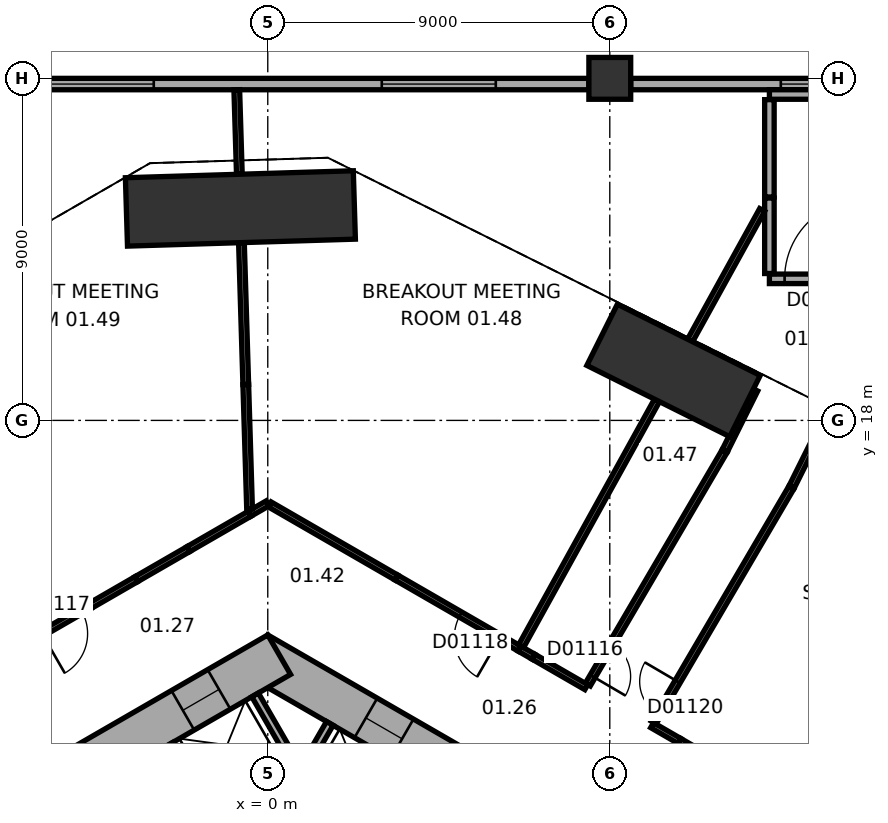
"""IFC4 building model, lengths in metres.
Left out: names, types, materials, properties, quantities, classifications, styles, units other than length and angle.
Written with IfcOpenShell. Run it as: python <this file> out.ifc"""

import sys

from ifc_helpers import new_model, si_unit, direction, frame, frame_2d, origin, origin_2d, place, context, subcontext, project, spatial, rectangle, extrude, element, fill, save


model = new_model("IFC4")
c1 = context("Model", 3, precision=1e-05, world=origin(), true_north=direction((0.0, 1.0)))
c2 = subcontext(c1, "Body", "Model", "MODEL_VIEW")
j1 = project(units=[si_unit("LENGTHUNIT", "METRE"), si_unit("PLANEANGLEUNIT", "RADIAN")], contexts=[c1])
p1 = place(None, origin())
s1 = spatial("IfcSite", under=j1, at=p1, CompositionType="ELEMENT")
p2 = place(p1, origin())
s2 = spatial("IfcBuilding", under=s1, at=p2, CompositionType="ELEMENT")
p3 = place(p2, frame((0.0, 0.0, 7.5)))
s3 = spatial("IfcBuildingStorey", under=s2, at=p3, CompositionType="ELEMENT", Elevation=7.5)
p4 = place(p3, frame((10.677, 19.315, 0.0), z_axis=(0.0, 0.0, 1.0), x_axis=(-0.894935140363, 0.446196251154, 0.0)))
e1 = element("IfcColumn", 1, at=p4, inside=s3, PredefinedType="COLUMN", context=c2, shape_type="SweptSolid", body=[
    extrude(rectangle(XDim=4.2, YDim=1.8, at=origin_2d()), origin(), (0.0, 0.0, 1.0), 5.5),
])
p5 = place(p3, frame((-0.72, 23.577, 0.0), z_axis=(0.0, 0.0, 1.0), x_axis=(-0.999533644135, -0.030536768695, 0.0)))
e2 = element("IfcColumn", 2, at=p5, inside=s3, PredefinedType="COLUMN", context=c2, shape_type="SweptSolid", body=[
    extrude(rectangle(XDim=6.0, YDim=1.8, at=origin_2d()), origin(), (0.0, 0.0, 1.0), 5.5),
])
p6 = place(p3, frame((9.0, 27.0, 0.0), z_axis=(0.0, 0.0, 1.0), x_axis=(1.0, 0.0, 0.0)))
e3 = element("IfcColumn", 3, at=p6, inside=s3, PredefinedType="COLUMN", context=c2, shape_type="SweptSolid", body=[
    extrude(rectangle(XDim=1.1, YDim=1.1, at=origin_2d()), origin(), (0.0, 0.0, 1.0), 5.5),
])
p7 = place(p3, frame((10.4, 5.658, 0.0), z_axis=(0.0, 0.0, 1.0), x_axis=(-0.866021384402, 0.500006961711, 0.0)))
e4 = element("IfcWall", 4, at=p7, inside=s3, PredefinedType="SHEAR", context=c2, shape_type="SweptSolid", body=[
    extrude(rectangle(XDim=12.355, YDim=1.2, at=frame_2d((6.178, 0.0))), origin(), (0.0, 0.0, 1.0), 5.5),
])
p8 = place(p7, frame((2.728, 0.0, 0.0)))
e5 = element("IfcOpeningElement", 5, at=p8, cuts=e4, PredefinedType="OPENING", context=c2, shape_type="SweptSolid", body=[
    extrude(rectangle(XDim=1.1, YDim=2.1, at=frame_2d((0.55, 1.05))), frame((0.0, 0.61, 0.0), z_axis=(0.0, -1.0, 0.0), x_axis=(1.0, 0.0, 0.0)), (0.0, 0.0, 1.0), 1.22),
])
p9 = place(p7, frame((5.328, 0.0, 0.0)))
e6 = element("IfcOpeningElement", 6, at=p9, cuts=e4, PredefinedType="OPENING", context=c2, shape_type="SweptSolid", body=[
    extrude(rectangle(XDim=1.1, YDim=2.1, at=frame_2d((0.55, 1.05))), frame((0.0, 0.61, 0.0), z_axis=(0.0, -1.0, 0.0), x_axis=(1.0, 0.0, 0.0)), (0.0, 0.0, 1.0), 1.22),
])
p10 = place(p7, frame((7.928, 0.0, 0.0)))
e7 = element("IfcOpeningElement", 7, at=p10, cuts=e4, PredefinedType="OPENING", context=c2, shape_type="SweptSolid", body=[
    extrude(rectangle(XDim=1.1, YDim=2.1, at=frame_2d((0.55, 1.05))), frame((0.0, 0.61, 0.0), z_axis=(0.0, -1.0, 0.0), x_axis=(1.0, 0.0, 0.0)), (0.0, 0.0, 1.0), 1.22),
])
p11 = place(p3, frame((0.3, 11.836, 0.0), z_axis=(0.0, 0.0, 1.0), x_axis=(-0.866021384402, -0.500006961711, 0.0)))
e8 = element("IfcWall", 8, at=p11, inside=s3, PredefinedType="SHEAR", context=c2, shape_type="SweptSolid", body=[
    extrude(rectangle(XDim=12.355, YDim=1.2, at=frame_2d((6.178, 0.0))), origin(), (0.0, 0.0, 1.0), 5.5),
])
p12 = place(p11, frame((6.378, 0.0, 0.0)))
e9 = element("IfcOpeningElement", 9, at=p12, cuts=e8, PredefinedType="OPENING", context=c2, shape_type="SweptSolid", body=[
    extrude(rectangle(XDim=1.5, YDim=2.1, at=frame_2d((0.75, 1.05))), frame((0.0, 0.61, 0.0), z_axis=(0.0, -1.0, 0.0), x_axis=(1.0, 0.0, 0.0)), (0.0, 0.0, 1.0), 1.22),
])
p13 = place(p11, frame((1.828, 0.0, 0.0)))
e10 = element("IfcOpeningElement", 10, at=p13, cuts=e8, PredefinedType="OPENING", context=c2, shape_type="SweptSolid", body=[
    extrude(rectangle(XDim=1.1, YDim=2.1, at=frame_2d((0.55, 1.05))), frame((0.0, 0.61, 0.0), z_axis=(0.0, -1.0, 0.0), x_axis=(1.0, 0.0, 0.0)), (0.0, 0.0, 1.0), 1.22),
])
p14 = place(p3, frame((26.45, 26.85, 0.0), z_axis=(0.0, 0.0, 1.0), x_axis=(-1.0, 0.0, 0.0)))
e11 = element("IfcWall", 11, at=p14, inside=s3, PredefinedType="STANDARD", context=c2, shape_type="SweptSolid", body=[
    extrude(rectangle(XDim=16.9, YDim=0.3, at=frame_2d((8.45, 0.0))), origin(), (0.0, 0.0, 1.0), 4.0),
])
p15 = place(p14, frame((2.95, 0.0, 1.0)))
e12 = element("IfcOpeningElement", 12, at=p15, cuts=e11, PredefinedType="OPENING", context=c2, shape_type="SweptSolid", body=[
    extrude(rectangle(XDim=3.0, YDim=2.6, at=frame_2d((1.5, 1.3))), frame((0.0, 0.16, 0.0), z_axis=(0.0, -1.0, 0.0), x_axis=(1.0, 0.0, 0.0)), (0.0, 0.0, 1.0), 0.32),
])
p16 = place(p14, frame((9.95, 0.0, 1.0)))
e13 = element("IfcOpeningElement", 13, at=p16, cuts=e11, PredefinedType="OPENING", context=c2, shape_type="SweptSolid", body=[
    extrude(rectangle(XDim=3.0, YDim=2.6, at=frame_2d((1.5, 1.3))), frame((0.0, 0.16, 0.0), z_axis=(0.0, -1.0, 0.0), x_axis=(1.0, 0.0, 0.0)), (0.0, 0.0, 1.0), 0.32),
])
p17 = place(p3, frame((8.45, 26.85, 0.0), z_axis=(0.0, 0.0, 1.0), x_axis=(-1.0, 0.0, 0.0)))
e14 = element("IfcWall", 14, at=p17, inside=s3, PredefinedType="STANDARD", context=c2, shape_type="SweptSolid", body=[
    extrude(rectangle(XDim=16.9, YDim=0.3, at=frame_2d((8.45, 0.0))), origin(), (0.0, 0.0, 1.0), 4.0),
])
p18 = place(p17, frame((2.45, 0.0, 1.0)))
e15 = element("IfcOpeningElement", 15, at=p18, cuts=e14, PredefinedType="OPENING", context=c2, shape_type="SweptSolid", body=[
    extrude(rectangle(XDim=3.0, YDim=2.6, at=frame_2d((1.5, 1.3))), frame((0.0, 0.16, 0.0), z_axis=(0.0, -1.0, 0.0), x_axis=(1.0, 0.0, 0.0)), (0.0, 0.0, 1.0), 0.32),
])
p19 = place(p17, frame((11.45, 0.0, 1.0)))
e16 = element("IfcOpeningElement", 16, at=p19, cuts=e14, PredefinedType="OPENING", context=c2, shape_type="SweptSolid", body=[
    extrude(rectangle(XDim=3.0, YDim=2.6, at=frame_2d((1.5, 1.3))), frame((0.0, 0.16, 0.0), z_axis=(0.0, -1.0, 0.0), x_axis=(1.0, 0.0, 0.0)), (0.0, 0.0, 1.0), 0.32),
])
p20 = place(p3, frame((0.532, 8.122, 0.0), z_axis=(0.0, 0.0, 1.0), x_axis=(0.500077893725, 0.86598042715, 0.0)))
e17 = element("IfcWall", 17, at=p20, inside=s3, PredefinedType="PARTITIONING", context=c2, shape_type="SweptSolid", body=[
    extrude(rectangle(XDim=2.2, YDim=0.2, at=frame_2d((1.1, 0.0))), origin(), (0.0, 0.0, 1.0), 5.2),
])
p21 = place(p3, frame((0.767, 8.872, 0.0), z_axis=(0.0, 0.0, 1.0), x_axis=(-0.499994660107, 0.866028486751, 0.0)))
e18 = element("IfcWall", 18, at=p21, inside=s3, PredefinedType="PARTITIONING", context=c2, shape_type="SweptSolid", body=[
    extrude(rectangle(XDim=2.2, YDim=0.2, at=frame_2d((1.1, 0.0))), origin(), (0.0, 0.0, 1.0), 5.2),
])
p22 = place(p3, frame((-1.485, 7.572, 0.0), z_axis=(0.0, 0.0, 1.0), x_axis=(-0.50002983664, 0.866008176907, 0.0)))
e19 = element("IfcWall", 19, at=p22, inside=s3, PredefinedType="PARTITIONING", context=c2, shape_type="SweptSolid", body=[
    extrude(rectangle(XDim=2.2, YDim=0.2, at=frame_2d((1.1, 0.0))), origin(), (0.0, 0.0, 1.0), 5.2),
])
p23 = place(p3, frame((10.833, 9.564, 0.0), z_axis=(0.0, 0.0, 1.0), x_axis=(0.866091368387, -0.499885728548, 0.0)))
e20 = element("IfcWall", 20, at=p23, inside=s3, PredefinedType="PARTITIONING", context=c2, shape_type="SweptSolid", body=[
    extrude(rectangle(XDim=2.761, YDim=0.15, at=frame_2d((1.381, 0.0))), origin(), (0.0, 0.0, 1.0), 5.2),
])
p24 = place(p3, frame((10.114, 9.98, 0.0), z_axis=(0.0, 0.0, 1.0), x_axis=(0.865848115047, -0.500306947453, 0.0)))
e21 = element("IfcWall", 21, at=p24, inside=s3, PredefinedType="PARTITIONING", context=c2, shape_type="SweptSolid", body=[
    extrude(rectangle(XDim=0.832, YDim=0.15, at=frame_2d((0.416, 0.0))), origin(), (0.0, 0.0, 1.0), 5.2),
])
p25 = place(p3, frame((8.422, 11.05, 0.0), z_axis=(0.0, 0.0, 1.0), x_axis=(0.50561651199, 0.862758333952, 0.0)))
e22 = element("IfcWall", 22, at=p25, inside=s3, PredefinedType="PARTITIONING", context=c2, shape_type="SweptSolid", body=[
    extrude(rectangle(XDim=7.118, YDim=0.15, at=frame_2d((3.559, 0.0))), origin(), (0.0, 0.0, 1.0), 4.4),
])
p26 = place(p25, frame((0.25, 0.0, 0.0)))
e23 = element("IfcOpeningElement", 23, at=p26, cuts=e22, PredefinedType="OPENING", context=c2, shape_type="SweptSolid", body=[
    extrude(rectangle(XDim=1.0, YDim=2.1, at=frame_2d((0.5, 1.05))), frame((0.0, 0.085, 0.0), z_axis=(0.0, -1.0, 0.0), x_axis=(1.0, 0.0, 0.0)), (0.0, 0.0, 1.0), 0.17),
])
p27 = place(p3, frame((-7.354, 11.573, 0.0), z_axis=(0.0, 0.0, 1.0), x_axis=(0.866051051954, 0.499955573435, 0.0)))
e24 = element("IfcWall", 24, at=p27, inside=s3, PredefinedType="PARTITIONING", context=c2, shape_type="SweptSolid", body=[
    extrude(rectangle(XDim=3.082, YDim=0.15, at=frame_2d((1.541, 0.0))), origin(), (0.0, 0.0, 1.0), 5.2),
])
p28 = place(p27, frame((1.632, 0.0, 0.0)))
e25 = element("IfcOpeningElement", 25, at=p28, cuts=e24, PredefinedType="OPENING", context=c2, shape_type="SweptSolid", body=[
    extrude(rectangle(XDim=1.2, YDim=2.1, at=frame_2d((0.6, 1.05))), frame((0.0, 0.085, 0.0), z_axis=(0.0, -1.0, 0.0), x_axis=(1.0, 0.0, 0.0)), (0.0, 0.0, 1.0), 0.17),
])
p29 = place(p3, frame((6.995, 11.781, 0.0), z_axis=(0.0, 0.0, 1.0), x_axis=(0.866076391369, -0.499911676512, 0.0)))
e26 = element("IfcWall", 26, at=p29, inside=s3, PredefinedType="PARTITIONING", context=c2, shape_type="SweptSolid", body=[
    extrude(rectangle(XDim=1.601, YDim=0.15, at=frame_2d((0.8, 0.0))), origin(), (0.0, 0.0, 1.0), 5.2),
])
p30 = place(p3, frame((6.995, 11.781, 0.0), z_axis=(0.0, 0.0, 1.0), x_axis=(-0.866281716711, 0.49955578997, 0.0)))
e27 = element("IfcWall", 27, at=p30, inside=s3, PredefinedType="PARTITIONING", context=c2, shape_type="SweptSolid", body=[
    extrude(rectangle(XDim=0.423, YDim=0.15, at=frame_2d((0.211, 0.0))), origin(), (0.0, 0.0, 1.0), 5.2),
])
p31 = place(p3, frame((6.629, 11.992, 0.0), z_axis=(0.0, 0.0, 1.0), x_axis=(-0.86599558016, 0.500051652475, 0.0)))
e28 = element("IfcWall", 28, at=p31, inside=s3, PredefinedType="PARTITIONING", context=c2, shape_type="SweptSolid", body=[
    extrude(rectangle(XDim=3.745, YDim=0.15, at=frame_2d((1.872, 0.0))), origin(), (0.0, 0.0, 1.0), 5.2),
])
p32 = place(p31, frame((0.6, 0.0, 0.0)))
e29 = element("IfcOpeningElement", 29, at=p32, cuts=e28, PredefinedType="OPENING", context=c2, shape_type="SweptSolid", body=[
    extrude(rectangle(XDim=1.2, YDim=2.1, at=frame_2d((0.6, 1.05))), frame((0.0, 0.085, 0.0), z_axis=(0.0, -1.0, 0.0), x_axis=(1.0, 0.0, 0.0)), (0.0, 0.0, 1.0), 0.17),
])
p33 = place(p3, frame((6.668, 12.062, 0.0), z_axis=(0.0, 0.0, 1.0), x_axis=(0.483795376692, 0.875181143245, 0.0)))
e30 = element("IfcWall", 30, at=p33, inside=s3, PredefinedType="PARTITIONING", context=c2, shape_type="SweptSolid", body=[
    extrude(rectangle(XDim=7.387, YDim=0.15, at=frame_2d((3.693, 0.0))), origin(), (0.0, 0.0, 1.0), 5.2),
])
p34 = place(p3, frame((19.949, 12.345, 0.0), z_axis=(0.0, 0.0, 1.0), x_axis=(-0.850341306025, -0.526231568102, 0.0)))
e31 = element("IfcWall", 31, at=p34, inside=s3, PredefinedType="PARTITIONING", context=c2, shape_type="SweptSolid", body=[
    extrude(rectangle(XDim=7.787, YDim=0.15, at=frame_2d((3.894, 0.0))), origin(), (0.0, 0.0, 1.0), 5.2),
])
p35 = place(p3, frame((-3.46, 13.822, 0.0), z_axis=(0.0, 0.0, 1.0), x_axis=(-0.866004557827, -0.500036104519, 0.0)))
e32 = element("IfcWall", 32, at=p35, inside=s3, PredefinedType="PARTITIONING", context=c2, shape_type="SweptSolid", body=[
    extrude(rectangle(XDim=1.415, YDim=0.15, at=frame_2d((0.708, 0.0))), origin(), (0.0, 0.0, 1.0), 5.2),
])
p36 = place(p3, frame((3.386, 13.865, 0.0), z_axis=(0.0, 0.0, 1.0), x_axis=(-0.866006051527, 0.500033517596, 0.0)))
e33 = element("IfcWall", 33, at=p36, inside=s3, PredefinedType="PARTITIONING", context=c2, shape_type="SweptSolid", body=[
    extrude(rectangle(XDim=3.85, YDim=0.15, at=frame_2d((1.925, 0.0))), origin(), (0.0, 0.0, 1.0), 5.2),
])
p37 = place(p3, frame((-2.087, 14.615, 0.0), z_axis=(0.0, 0.0, 1.0), x_axis=(-0.866054784643, -0.499949107407, 0.0)))
e34 = element("IfcWall", 34, at=p37, inside=s3, PredefinedType="PARTITIONING", context=c2, shape_type="SweptSolid", body=[
    extrude(rectangle(XDim=1.585, YDim=0.15, at=frame_2d((0.792, 0.0))), origin(), (0.0, 0.0, 1.0), 5.2),
])
p38 = place(p3, frame((-2.087, 14.615, 0.0), z_axis=(0.0, 0.0, 1.0), x_axis=(0.866006459158, 0.500032811619, 0.0)))
e35 = element("IfcWall", 35, at=p38, inside=s3, PredefinedType="PARTITIONING", context=c2, shape_type="SweptSolid", body=[
    extrude(rectangle(XDim=1.861, YDim=0.15, at=frame_2d((0.931, 0.0))), origin(), (0.0, 0.0, 1.0), 5.2),
])
p39 = place(p3, frame((-0.475, 15.545, 0.0), z_axis=(0.0, 0.0, 1.0), x_axis=(0.865933599817, 0.500158975434, 0.0)))
e36 = element("IfcWall", 36, at=p39, inside=s3, PredefinedType="PARTITIONING", context=c2, shape_type="SweptSolid", body=[
    extrude(rectangle(XDim=0.549, YDim=0.15, at=frame_2d((0.274, 0.0))), origin(), (0.0, 0.0, 1.0), 5.2),
])
p40 = place(p3, frame((13.772, 16.224, 0.0), z_axis=(0.0, 0.0, 1.0), x_axis=(-0.505547889018, -0.862798546539, 0.0)))
e37 = element("IfcWall", 37, at=p40, inside=s3, PredefinedType="PARTITIONING", context=c2, shape_type="SweptSolid", body=[
    extrude(rectangle(XDim=7.156, YDim=0.15, at=frame_2d((3.578, 0.0))), origin(), (0.0, 0.0, 1.0), 5.2),
])
p41 = place(p40, frame((5.906, 0.0, 0.0)))
e38 = element("IfcOpeningElement", 38, at=p41, cuts=e37, PredefinedType="OPENING", context=c2, shape_type="SweptSolid", body=[
    extrude(rectangle(XDim=1.0, YDim=2.1, at=frame_2d((0.5, 1.05))), frame((0.0, 0.085, 0.0), z_axis=(0.0, -1.0, 0.0), x_axis=(1.0, 0.0, 0.0)), (0.0, 0.0, 1.0), 0.17),
])
p42 = place(p3, frame((14.56, 17.803, 0.0), z_axis=(0.0, 0.0, 1.0), x_axis=(-0.44574598187, -0.895159493971, 0.0)))
e39 = element("IfcWall", 39, at=p42, inside=s3, PredefinedType="PARTITIONING", context=c2, shape_type="SweptSolid", body=[
    extrude(rectangle(XDim=1.731, YDim=0.15, at=frame_2d((0.865, 0.0))), origin(), (0.0, 0.0, 1.0), 5.2),
])
p43 = place(p3, frame((12.825, 18.807, 0.0), z_axis=(0.0, 0.0, 1.0), x_axis=(-0.445626254489, -0.895219102404, 0.0)))
e40 = element("IfcWall", 40, at=p43, inside=s3, PredefinedType="PARTITIONING", context=c2, shape_type="SweptSolid", body=[
    extrude(rectangle(XDim=1.785, YDim=0.15, at=frame_2d((0.893, 0.0))), origin(), (0.0, 0.0, 1.0), 5.2),
])
p44 = place(p3, frame((-0.579, 18.946, 0.0), z_axis=(0.0, 0.0, 1.0), x_axis=(0.030572886356, -0.999532540051, 0.0)))
e41 = element("IfcWall", 41, at=p44, inside=s3, PredefinedType="PARTITIONING", context=c2, shape_type="SweptSolid", body=[
    extrude(rectangle(XDim=3.282, YDim=0.15, at=frame_2d((1.641, 0.0))), origin(), (0.0, 0.0, 1.0), 5.2),
])
p45 = place(p3, frame((-0.579, 18.946, 0.0), z_axis=(0.0, 0.0, 1.0), x_axis=(-0.030471255388, 0.999535643484, 0.0)))
e42 = element("IfcWall", 42, at=p45, inside=s3, PredefinedType="PARTITIONING", context=c2, shape_type="SweptSolid", body=[
    extrude(rectangle(XDim=3.734, YDim=0.15, at=frame_2d((1.867, 0.0))), origin(), (0.0, 0.0, 1.0), 5.2),
])
p46 = place(p3, frame((16.499, 21.725, 0.0), z_axis=(0.0, 0.0, 1.0), x_axis=(-1.0, 0.0, 0.0)))
e43 = element("IfcWall", 43, at=p46, inside=s3, PredefinedType="SOLIDWALL", context=c2, shape_type="SweptSolid", body=[
    extrude(rectangle(XDim=3.299, YDim=0.25, at=frame_2d((1.649, 0.0))), origin(), (0.0, 0.0, 1.0), 5.2),
])
p47 = place(p46, frame((0.799, 0.0, 0.0)))
e44 = element("IfcOpeningElement", 44, at=p47, cuts=e43, PredefinedType="OPENING", context=c2, shape_type="SweptSolid", body=[
    extrude(rectangle(XDim=2.1, YDim=2.4, at=frame_2d((1.05, 1.2))), frame((0.0, 0.135, 0.0), z_axis=(0.0, -1.0, 0.0), x_axis=(1.0, 0.0, 0.0)), (0.0, 0.0, 1.0), 0.27),
])
p48 = place(p3, frame((13.2, 21.865, 0.0), z_axis=(0.0, 0.0, 1.0), x_axis=(0.0, 1.0, 0.0)))
e45 = element("IfcWall", 45, at=p48, inside=s3, PredefinedType="SOLIDWALL", context=c2, shape_type="SweptSolid", body=[
    extrude(rectangle(XDim=1.986, YDim=0.25, at=frame_2d((0.993, 0.0))), origin(), (0.0, 0.0, 1.0), 5.2),
])
p49 = place(p3, frame((13.01, 23.538, 0.0), z_axis=(0.0, 0.0, 1.0), x_axis=(-0.483449030978, -0.875372511818, 0.0)))
e46 = element("IfcWall", 46, at=p49, inside=s3, PredefinedType="PARTITIONING", context=c2, shape_type="SweptSolid", body=[
    extrude(rectangle(XDim=3.924, YDim=0.15, at=frame_2d((1.962, 0.0))), origin(), (0.0, 0.0, 1.0), 5.2),
])
p50 = place(p3, frame((13.2, 23.878, 0.0), z_axis=(0.0, 0.0, 1.0), x_axis=(0.0, 1.0, 0.0)))
e47 = element("IfcWall", 47, at=p50, inside=s3, PredefinedType="SOLIDWALL", context=c2, shape_type="SweptSolid", body=[
    extrude(rectangle(XDim=2.562, YDim=0.25, at=frame_2d((1.281, 0.0))), origin(), (0.0, 0.0, 1.0), 5.2),
])
p51 = place(p3, frame((-0.748, 24.477, 0.0), z_axis=(0.0, 0.0, 1.0), x_axis=(-0.030405439098, 0.999537647752, 0.0)))
e48 = element("IfcWall", 48, at=p51, inside=s3, PredefinedType="PARTITIONING", context=c2, shape_type="SweptSolid", body=[
    extrude(rectangle(XDim=2.224, YDim=0.15, at=frame_2d((1.112, 0.0))), origin(), (0.0, 0.0, 1.0), 5.2),
])
p52 = place(p3, frame((24.0, 26.575, 0.0), z_axis=(0.0, 0.0, 1.0), x_axis=(-1.0, 0.0, 0.0)))
e49 = element("IfcWall", 49, at=p52, inside=s3, PredefinedType="SOLIDWALL", context=c2, shape_type="SweptSolid", body=[
    extrude(rectangle(XDim=10.8, YDim=0.25, at=frame_2d((5.4, 0.0))), origin(), (0.0, 0.0, 1.0), 5.2),
])
p53 = place(p16, origin())
e50 = element("IfcWindow", 50, at=p53, inside=s3, PartitioningType="SINGLE_PANEL", PredefinedType="WINDOW", context=c2, shape_type="SweptSolid", body=[
    extrude(rectangle(XDim=3.0, YDim=2.6, at=frame_2d((1.5, 1.3))), frame((0.0, 0.03, 0.0), z_axis=(0.0, -1.0, 0.0), x_axis=(1.0, 0.0, 0.0)), (0.0, 0.0, 1.0), 0.06),
])
fill(e13, e50)
p54 = place(p18, origin())
e51 = element("IfcWindow", 51, at=p54, inside=s3, PartitioningType="SINGLE_PANEL", PredefinedType="WINDOW", context=c2, shape_type="SweptSolid", body=[
    extrude(rectangle(XDim=3.0, YDim=2.6, at=frame_2d((1.5, 1.3))), frame((0.0, 0.03, 0.0), z_axis=(0.0, -1.0, 0.0), x_axis=(1.0, 0.0, 0.0)), (0.0, 0.0, 1.0), 0.06),
])
fill(e15, e51)
p55 = place(p19, origin())
e52 = element("IfcWindow", 52, at=p55, inside=s3, PartitioningType="SINGLE_PANEL", PredefinedType="WINDOW", context=c2, shape_type="SweptSolid", body=[
    extrude(rectangle(XDim=3.0, YDim=2.6, at=frame_2d((1.5, 1.3))), frame((0.0, 0.03, 0.0), z_axis=(0.0, -1.0, 0.0), x_axis=(1.0, 0.0, 0.0)), (0.0, 0.0, 1.0), 0.06),
])
fill(e16, e52)
p56 = place(p10, origin())
e53 = element("IfcDoor", 53, at=p56, inside=s3, OperationType="DOUBLE_DOOR_SLIDING", PredefinedType="DOOR", context=c2, shape_type="SweptSolid", body=[
    extrude(rectangle(XDim=1.1, YDim=2.1, at=frame_2d((0.55, 1.05))), frame((0.0, 0.025, 0.0), z_axis=(0.0, -1.0, 0.0), x_axis=(1.0, 0.0, 0.0)), (0.0, 0.0, 1.0), 0.05),
])
fill(e7, e53)
p57 = place(p13, origin())
e54 = element("IfcDoor", 54, at=p57, inside=s3, OperationType="DOUBLE_DOOR_SLIDING", PredefinedType="DOOR", context=c2, shape_type="SweptSolid", body=[
    extrude(rectangle(XDim=1.1, YDim=2.1, at=frame_2d((0.55, 1.05))), frame((0.0, 0.025, 0.0), z_axis=(0.0, -1.0, 0.0), x_axis=(1.0, 0.0, 0.0)), (0.0, 0.0, 1.0), 0.05),
])
fill(e10, e54)
p58 = place(p26, origin())
e55 = element("IfcDoor", 55, at=p58, inside=s3, OperationType="SINGLE_SWING_LEFT", PredefinedType="DOOR", context=c2, shape_type="SweptSolid", body=[
    extrude(rectangle(XDim=1.0, YDim=2.1, at=frame_2d((0.5, 1.05))), frame((0.0, 0.025, 0.0), z_axis=(0.0, -1.0, 0.0), x_axis=(1.0, 0.0, 0.0)), (0.0, 0.0, 1.0), 0.05),
])
fill(e23, e55)
p59 = place(p28, origin())
e56 = element("IfcDoor", 56, at=p59, inside=s3, OperationType="SINGLE_SWING_LEFT", PredefinedType="DOOR", context=c2, shape_type="SweptSolid", body=[
    extrude(rectangle(XDim=1.2, YDim=2.1, at=frame_2d((0.6, 1.05))), frame((0.0, 0.025, 0.0), z_axis=(0.0, -1.0, 0.0), x_axis=(1.0, 0.0, 0.0)), (0.0, 0.0, 1.0), 0.05),
])
fill(e25, e56)
p60 = place(p32, origin())
e57 = element("IfcDoor", 57, at=p60, inside=s3, OperationType="SINGLE_SWING_LEFT", PredefinedType="DOOR", context=c2, shape_type="SweptSolid", body=[
    extrude(rectangle(XDim=1.2, YDim=2.1, at=frame_2d((0.6, 1.05))), frame((0.0, 0.025, 0.0), z_axis=(0.0, -1.0, 0.0), x_axis=(1.0, 0.0, 0.0)), (0.0, 0.0, 1.0), 0.05),
])
fill(e29, e57)
p61 = place(p41, origin())
e58 = element("IfcDoor", 58, at=p61, inside=s3, OperationType="SINGLE_SWING_LEFT", PredefinedType="DOOR", context=c2, shape_type="SweptSolid", body=[
    extrude(rectangle(XDim=1.0, YDim=2.1, at=frame_2d((0.5, 1.05))), frame((0.0, 0.025, 0.0), z_axis=(0.0, -1.0, 0.0), x_axis=(1.0, 0.0, 0.0)), (0.0, 0.0, 1.0), 0.05),
])
fill(e38, e58)
p62 = place(p47, frame((2.1, 0.0, 0.0), z_axis=(0.0, 0.0, 1.0), x_axis=(-1.0, 0.0, 0.0)))
e59 = element("IfcDoor", 59, at=p62, inside=s3, OperationType="DOUBLE_DOOR_SINGLE_SWING", PredefinedType="DOOR", context=c2, shape_type="SweptSolid", body=[
    extrude(rectangle(XDim=2.1, YDim=2.4, at=frame_2d((1.05, 1.2))), frame((0.0, 0.025, 0.0), z_axis=(0.0, -1.0, 0.0), x_axis=(1.0, 0.0, 0.0)), (0.0, 0.0, 1.0), 0.05),
])
fill(e44, e59)
save(model, sys.argv[1])
